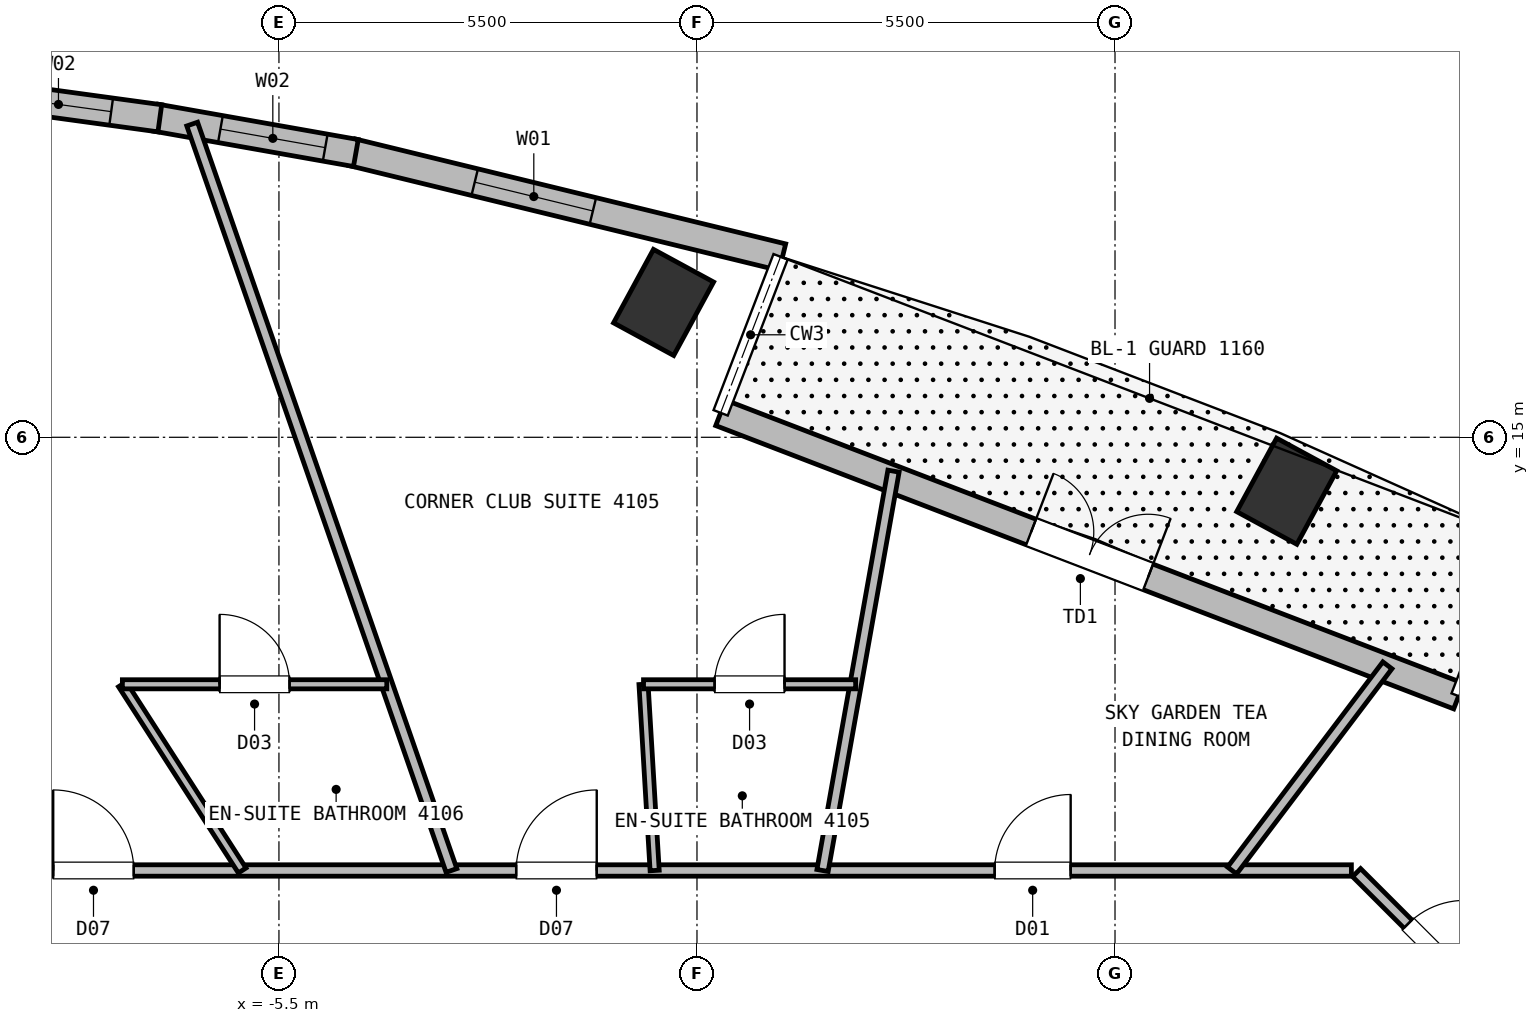
"""IFC4 building model, lengths in metres.
Left out: names, types, materials, properties, quantities, classifications, styles, units other than length and angle.
Written with IfcOpenShell. Run it as: python <this file> out.ifc"""

import sys

from ifc_helpers import new_model, si_unit, direction, frame, frame_2d, origin, origin_2d, place, context, subcontext, project, spatial, rectangle, extrude, element, fill, save


model = new_model("IFC4")
c1 = context("Model", 3, precision=1e-05, world=origin(), true_north=direction((0.0, 1.0)))
c2 = subcontext(c1, "Body", "Model", "MODEL_VIEW")
j1 = project(units=[si_unit("LENGTHUNIT", "METRE"), si_unit("PLANEANGLEUNIT", "RADIAN")], contexts=[c1])
p1 = place(None, origin())
s1 = spatial("IfcSite", under=j1, at=p1, CompositionType="ELEMENT")
p2 = place(p1, origin())
s2 = spatial("IfcBuilding", under=s1, at=p2, CompositionType="ELEMENT")
p3 = place(p2, frame((0.0, 0.0, 153.5)))
s3 = spatial("IfcBuildingStorey", under=s2, at=p3, CompositionType="ELEMENT", Elevation=153.5)
for number, where, z_axis, x_axis in (
    (1, (7.759, 14.29, 0.0), (0.0, 0.0, 1.0), (-0.879, 0.477, 0.0)),
    (2, (-0.439, 16.774, 0.0), (0.0, 0.0, 1.0), (-0.879, 0.477, 0.0)),
):
    element("IfcColumn", number, at=place(p3, frame(where, z_axis=z_axis, x_axis=x_axis)), inside=s3, PredefinedType="COLUMN", context=c2, shape_type="SweptSolid", body=[
        extrude(rectangle(XDim=0.9, YDim=1.1, at=origin_2d()), origin(), (0.0, 0.0, 1.0), 3.75),
    ])
p4 = place(p3, frame((0.312, 15.322, 0.0), z_axis=(0.0, 0.0, 1.0), x_axis=(0.933571699069, -0.358390684445, 0.0)))
e3 = element("IfcWall", 3, at=p4, inside=s3, PredefinedType="SOLIDWALL", context=c2, shape_type="SweptSolid", body=[
    extrude(rectangle(XDim=10.4, YDim=0.36, at=frame_2d((5.2, 0.0))), origin(), (0.0, 0.0, 1.0), 3.5),
])
p5 = place(p4, frame((4.375, 0.0, 0.0)))
e4 = element("IfcOpeningElement", 4, at=p5, cuts=e3, PredefinedType="OPENING", context=c2, shape_type="SweptSolid", body=[
    extrude(rectangle(XDim=1.65, YDim=2.25, at=frame_2d((0.825, 1.125))), frame((0.0, 0.19, 0.0), z_axis=(0.0, -1.0, 0.0), x_axis=(1.0, 0.0, 0.0)), (0.0, 0.0, 1.0), 0.38),
])
p6 = place(p3, frame((-4.537, 18.75, 0.0), z_axis=(0.0, 0.0, 1.0), x_axis=(0.971526219703, -0.236932067122, 0.0)))
e5 = element("IfcWall", 5, at=p6, inside=s3, PredefinedType="SOLIDWALL", context=c2, shape_type="SweptSolid", body=[
    extrude(rectangle(XDim=5.827, YDim=0.36, at=frame_2d((2.914, 0.0))), origin(), (0.0, 0.0, 1.0), 3.5),
])
p7 = place(p6, frame((1.66, 0.0, 0.72)))
e6 = element("IfcOpeningElement", 6, at=p7, cuts=e5, PredefinedType="OPENING", context=c2, shape_type="SweptSolid", body=[
    extrude(rectangle(XDim=1.6, YDim=1.88, at=frame_2d((0.8, 0.94))), frame((0.0, 0.19, 0.0), z_axis=(0.0, -1.0, 0.0), x_axis=(1.0, 0.0, 0.0)), (0.0, 0.0, 1.0), 0.38),
])
p8 = place(p3, frame((-7.117, 19.205, 0.0), z_axis=(0.0, 0.0, 1.0), x_axis=(0.984708898385, -0.174207879961, 0.0)))
e7 = element("IfcWall", 7, at=p8, inside=s3, PredefinedType="SOLIDWALL", context=c2, shape_type="SweptSolid", body=[
    extrude(rectangle(XDim=2.67, YDim=0.36, at=frame_2d((1.335, 0.0))), origin(), (0.0, 0.0, 1.0), 3.5),
])
p9 = place(p8, frame((0.86, 0.0, 0.72)))
e8 = element("IfcOpeningElement", 8, at=p9, cuts=e7, PredefinedType="OPENING", context=c2, shape_type="SweptSolid", body=[
    extrude(rectangle(XDim=1.4, YDim=1.84, at=frame_2d((0.7, 0.92))), frame((0.0, 0.19, 0.0), z_axis=(0.0, -1.0, 0.0), x_axis=(1.0, 0.0, 0.0)), (0.0, 0.0, 1.0), 0.38),
])
p10 = place(p3, frame((-9.734, 19.562, 0.0), z_axis=(0.0, 0.0, 1.0), x_axis=(0.990763260655, -0.135602954745, 0.0)))
e9 = element("IfcWall", 9, at=p10, inside=s3, PredefinedType="SOLIDWALL", context=c2, shape_type="SweptSolid", body=[
    extrude(rectangle(XDim=2.692, YDim=0.36, at=frame_2d((1.346, 0.0))), origin(), (0.0, 0.0, 1.0), 3.5),
])
p11 = place(p10, frame((0.646, 0.0, 0.72)))
e10 = element("IfcOpeningElement", 10, at=p11, cuts=e9, PredefinedType="OPENING", context=c2, shape_type="SweptSolid", body=[
    extrude(rectangle(XDim=1.4, YDim=1.84, at=frame_2d((0.7, 0.92))), frame((0.0, 0.19, 0.0), z_axis=(0.0, -1.0, 0.0), x_axis=(1.0, 0.0, 0.0)), (0.0, 0.0, 1.0), 0.38),
])
p12 = place(p3, frame((8.678, 9.272, 0.0), z_axis=(0.0, 0.0, 1.0), x_axis=(0.707106781187, -0.707106781187, 0.0)))
e11 = element("IfcWall", 11, at=p12, inside=s3, PredefinedType="PARTITIONING", context=c2, shape_type="SweptSolid", body=[
    extrude(rectangle(XDim=2.89, YDim=0.15, at=frame_2d((1.445, 0.0))), origin(), (0.0, 0.0, 1.0), 3.5),
])
p13 = place(p12, frame((0.955, 0.0, 0.0)))
e12 = element("IfcOpeningElement", 12, at=p13, cuts=e11, PredefinedType="OPENING", context=c2, shape_type="SweptSolid", body=[
    extrude(rectangle(XDim=1.06, YDim=2.15, at=frame_2d((0.53, 1.075))), frame((0.0, 0.085, 0.0), z_axis=(0.0, -1.0, 0.0), x_axis=(1.0, 0.0, 0.0)), (0.0, 0.0, 1.0), 0.17),
])
p14 = place(p3, frame((-8.61, 9.3, 0.0), z_axis=(0.0, 0.0, 1.0), x_axis=(1.0, 0.0, 0.0)))
e13 = element("IfcWall", 13, at=p14, inside=s3, PredefinedType="PARTITIONING", context=c2, shape_type="SweptSolid", body=[
    extrude(rectangle(XDim=17.22, YDim=0.15, at=frame_2d((8.61, 0.0))), origin(), (0.0, 0.0, 1.0), 3.5),
])
p15 = place(p14, frame((12.527, 0.0, 0.0)))
e14 = element("IfcOpeningElement", 14, at=p15, cuts=e13, PredefinedType="OPENING", context=c2, shape_type="SweptSolid", body=[
    extrude(rectangle(XDim=1.0, YDim=2.15, at=frame_2d((0.5, 1.075))), frame((0.0, 0.085, 0.0), z_axis=(0.0, -1.0, 0.0), x_axis=(1.0, 0.0, 0.0)), (0.0, 0.0, 1.0), 0.17),
])
p16 = place(p14, frame((6.231, 0.0, 0.0)))
e15 = element("IfcOpeningElement", 15, at=p16, cuts=e13, PredefinedType="OPENING", context=c2, shape_type="SweptSolid", body=[
    extrude(rectangle(XDim=1.06, YDim=2.15, at=frame_2d((0.53, 1.075))), frame((0.0, 0.085, 0.0), z_axis=(0.0, -1.0, 0.0), x_axis=(1.0, 0.0, 0.0)), (0.0, 0.0, 1.0), 0.17),
])
p17 = place(p14, frame((0.14, 0.0, 0.0)))
e16 = element("IfcOpeningElement", 16, at=p17, cuts=e13, PredefinedType="OPENING", context=c2, shape_type="SweptSolid", body=[
    extrude(rectangle(XDim=1.06, YDim=2.15, at=frame_2d((0.53, 1.075))), frame((0.0, 0.085, 0.0), z_axis=(0.0, -1.0, 0.0), x_axis=(1.0, 0.0, 0.0)), (0.0, 0.0, 1.0), 0.17),
])
p18 = place(p3, frame((7.04, 9.3, 0.0), z_axis=(0.0, 0.0, 1.0), x_axis=(0.603559151409, 0.797318224268, 0.0)))
e17 = element("IfcWall", 17, at=p18, inside=s3, PredefinedType="PARTITIONING", context=c2, shape_type="SweptSolid", body=[
    extrude(rectangle(XDim=3.386, YDim=0.15, at=frame_2d((1.693, 0.0))), origin(), (0.0, 0.0, 1.0), 3.5),
])
p19 = place(p3, frame((1.652, 9.3, 0.0), z_axis=(0.0, 0.0, 1.0), x_axis=(0.1749308498, 0.984580721824, 0.0)))
e18 = element("IfcWall", 18, at=p19, inside=s3, PredefinedType="PARTITIONING", context=c2, shape_type="SweptSolid", body=[
    extrude(rectangle(XDim=5.337, YDim=0.15, at=frame_2d((2.668, 0.0))), origin(), (0.0, 0.0, 1.0), 3.5),
])
p20 = place(p3, frame((-0.557, 9.3, 0.0), z_axis=(0.0, 0.0, 1.0), x_axis=(-0.059684144244, 0.998217312476, 0.0)))
e19 = element("IfcWall", 19, at=p20, inside=s3, PredefinedType="PARTITIONING", context=c2, shape_type="SweptSolid", body=[
    extrude(rectangle(XDim=2.454, YDim=0.12, at=frame_2d((1.227, 0.0))), origin(), (0.0, 0.0, 1.0), 3.5),
])
p21 = place(p3, frame((-0.703, 11.75, 0.0), z_axis=(0.0, 0.0, 1.0), x_axis=(1.0, 0.0, 0.0)))
e20 = element("IfcWall", 20, at=p21, inside=s3, PredefinedType="PARTITIONING", context=c2, shape_type="SweptSolid", body=[
    extrude(rectangle(XDim=2.791, YDim=0.12, at=frame_2d((1.396, 0.0))), origin(), (0.0, 0.0, 1.0), 3.5),
])
p22 = place(p21, frame((0.935, 0.0, 0.0)))
e21 = element("IfcOpeningElement", 21, at=p22, cuts=e20, PredefinedType="OPENING", context=c2, shape_type="SweptSolid", body=[
    extrude(rectangle(XDim=0.92, YDim=2.1, at=frame_2d((0.46, 1.05))), frame((0.0, 0.07, 0.0), z_axis=(0.0, -1.0, 0.0), x_axis=(1.0, 0.0, 0.0)), (0.0, 0.0, 1.0), 0.14),
])
p23 = place(p3, frame((-3.23, 9.3, 0.0), z_axis=(0.0, 0.0, 1.0), x_axis=(-0.328129858039, 0.944632625026, 0.0)))
e22 = element("IfcWall", 22, at=p23, inside=s3, PredefinedType="PARTITIONING", context=c2, shape_type="SweptSolid", body=[
    extrude(rectangle(XDim=10.396, YDim=0.15, at=frame_2d((5.198, 0.0))), origin(), (0.0, 0.0, 1.0), 3.5),
])
p24 = place(p3, frame((-5.984, 9.3, 0.0), z_axis=(0.0, 0.0, 1.0), x_axis=(-0.541109088666, 0.840952408976, 0.0)))
e23 = element("IfcWall", 23, at=p24, inside=s3, PredefinedType="PARTITIONING", context=c2, shape_type="SweptSolid", body=[
    extrude(rectangle(XDim=2.913, YDim=0.12, at=frame_2d((1.457, 0.0))), origin(), (0.0, 0.0, 1.0), 3.5),
])
p25 = place(p3, frame((-7.56, 11.75, 0.0), z_axis=(0.0, 0.0, 1.0), x_axis=(1.0, 0.0, 0.0)))
e24 = element("IfcWall", 24, at=p25, inside=s3, PredefinedType="PARTITIONING", context=c2, shape_type="SweptSolid", body=[
    extrude(rectangle(XDim=3.479, YDim=0.12, at=frame_2d((1.739, 0.0))), origin(), (0.0, 0.0, 1.0), 3.5),
])
p26 = place(p25, frame((1.279, 0.0, 0.0)))
e25 = element("IfcOpeningElement", 25, at=p26, cuts=e24, PredefinedType="OPENING", context=c2, shape_type="SweptSolid", body=[
    extrude(rectangle(XDim=0.92, YDim=2.1, at=frame_2d((0.46, 1.05))), frame((0.0, 0.07, 0.0), z_axis=(0.0, -1.0, 0.0), x_axis=(1.0, 0.0, 0.0)), (0.0, 0.0, 1.0), 0.14),
])
p27 = place(p5, origin())
e26 = element("IfcDoor", 26, at=p27, inside=s3, OperationType="DOUBLE_DOOR_SINGLE_SWING", PredefinedType="DOOR", context=c2, shape_type="SweptSolid", body=[
    extrude(rectangle(XDim=1.65, YDim=2.25, at=frame_2d((0.825, 1.125))), frame((0.0, 0.025, 0.0), z_axis=(0.0, -1.0, 0.0), x_axis=(1.0, 0.0, 0.0)), (0.0, 0.0, 1.0), 0.05),
])
fill(e4, e26)
p28 = place(p7, origin())
e27 = element("IfcWindow", 27, at=p28, inside=s3, PartitioningType="SINGLE_PANEL", PredefinedType="WINDOW", context=c2, shape_type="SweptSolid", body=[
    extrude(rectangle(XDim=1.6, YDim=1.88, at=frame_2d((0.8, 0.94))), frame((0.0, 0.03, 0.0), z_axis=(0.0, -1.0, 0.0), x_axis=(1.0, 0.0, 0.0)), (0.0, 0.0, 1.0), 0.06),
])
fill(e6, e27)
p29 = place(p9, origin())
e28 = element("IfcWindow", 28, at=p29, inside=s3, PartitioningType="SINGLE_PANEL", PredefinedType="WINDOW", context=c2, shape_type="SweptSolid", body=[
    extrude(rectangle(XDim=1.4, YDim=1.84, at=frame_2d((0.7, 0.92))), frame((0.0, 0.03, 0.0), z_axis=(0.0, -1.0, 0.0), x_axis=(1.0, 0.0, 0.0)), (0.0, 0.0, 1.0), 0.06),
])
fill(e8, e28)
p30 = place(p11, origin())
e29 = element("IfcWindow", 29, at=p30, inside=s3, PartitioningType="SINGLE_PANEL", PredefinedType="WINDOW", context=c2, shape_type="SweptSolid", body=[
    extrude(rectangle(XDim=1.4, YDim=1.84, at=frame_2d((0.7, 0.92))), frame((0.0, 0.03, 0.0), z_axis=(0.0, -1.0, 0.0), x_axis=(1.0, 0.0, 0.0)), (0.0, 0.0, 1.0), 0.06),
])
fill(e10, e29)
p31 = place(p22, origin())
e30 = element("IfcDoor", 30, at=p31, inside=s3, OperationType="SINGLE_SWING_RIGHT", PredefinedType="DOOR", context=c2, shape_type="SweptSolid", body=[
    extrude(rectangle(XDim=0.92, YDim=2.1, at=frame_2d((0.46, 1.05))), frame((0.0, 0.025, 0.0), z_axis=(0.0, -1.0, 0.0), x_axis=(1.0, 0.0, 0.0)), (0.0, 0.0, 1.0), 0.05),
])
fill(e21, e30)
p32 = place(p26, origin())
e31 = element("IfcDoor", 31, at=p32, inside=s3, OperationType="SINGLE_SWING_LEFT", PredefinedType="DOOR", context=c2, shape_type="SweptSolid", body=[
    extrude(rectangle(XDim=0.92, YDim=2.1, at=frame_2d((0.46, 1.05))), frame((0.0, 0.025, 0.0), z_axis=(0.0, -1.0, 0.0), x_axis=(1.0, 0.0, 0.0)), (0.0, 0.0, 1.0), 0.05),
])
fill(e25, e31)
p33 = place(p15, origin())
e32 = element("IfcDoor", 32, at=p33, inside=s3, OperationType="SINGLE_SWING_RIGHT", PredefinedType="DOOR", context=c2, shape_type="SweptSolid", body=[
    extrude(rectangle(XDim=1.0, YDim=2.15, at=frame_2d((0.5, 1.075))), frame((0.0, 0.025, 0.0), z_axis=(0.0, -1.0, 0.0), x_axis=(1.0, 0.0, 0.0)), (0.0, 0.0, 1.0), 0.05),
])
fill(e14, e32)
p34 = place(p16, origin())
e33 = element("IfcDoor", 33, at=p34, inside=s3, OperationType="SINGLE_SWING_RIGHT", PredefinedType="DOOR", context=c2, shape_type="SweptSolid", body=[
    extrude(rectangle(XDim=1.06, YDim=2.15, at=frame_2d((0.53, 1.075))), frame((0.0, 0.025, 0.0), z_axis=(0.0, -1.0, 0.0), x_axis=(1.0, 0.0, 0.0)), (0.0, 0.0, 1.0), 0.05),
])
fill(e15, e33)
p35 = place(p17, origin())
e34 = element("IfcDoor", 34, at=p35, inside=s3, OperationType="SINGLE_SWING_LEFT", PredefinedType="DOOR", context=c2, shape_type="SweptSolid", body=[
    extrude(rectangle(XDim=1.06, YDim=2.15, at=frame_2d((0.53, 1.075))), frame((0.0, 0.025, 0.0), z_axis=(0.0, -1.0, 0.0), x_axis=(1.0, 0.0, 0.0)), (0.0, 0.0, 1.0), 0.05),
])
fill(e16, e34)
p36 = place(p13, origin())
e35 = element("IfcDoor", 35, at=p36, inside=s3, OperationType="SINGLE_SWING_RIGHT", PredefinedType="DOOR", context=c2, shape_type="SweptSolid", body=[
    extrude(rectangle(XDim=1.06, YDim=2.15, at=frame_2d((0.53, 1.075))), frame((0.0, 0.025, 0.0), z_axis=(0.0, -1.0, 0.0), x_axis=(1.0, 0.0, 0.0)), (0.0, 0.0, 1.0), 0.05),
])
fill(e12, e35)
save(model, sys.argv[1])
